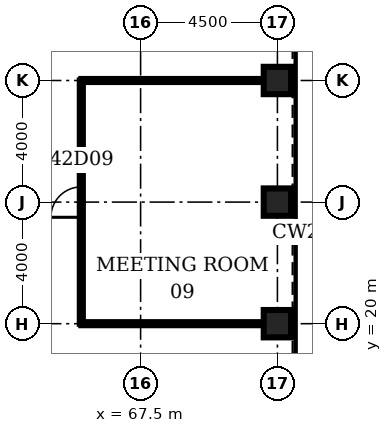
"""IFC4 building model, lengths in metres.
Left out: names, types, materials, properties, quantities, classifications, styles, units other than length and angle.
Written with IfcOpenShell. Run it as: python <this file> out.ifc"""

import sys

from ifc_helpers import new_model, si_unit, direction, frame, frame_2d, origin, origin_2d, place, context, subcontext, project, spatial, rectangle, hollow_rectangle, extrude, element, fill, save


model = new_model("IFC4")
c1 = context("Model", 3, precision=1e-05, world=origin(), true_north=direction((0.0, 1.0)))
c2 = subcontext(c1, "Body", "Model", "MODEL_VIEW")
j1 = project(units=[si_unit("LENGTHUNIT", "METRE"), si_unit("PLANEANGLEUNIT", "RADIAN")], contexts=[c1])
p1 = place(None, origin())
s1 = spatial("IfcSite", under=j1, at=p1, CompositionType="ELEMENT")
p2 = place(p1, origin())
s2 = spatial("IfcBuilding", under=s1, at=p2, CompositionType="ELEMENT")
p3 = place(p2, frame((0.0, 0.0, 190.0)))
s3 = spatial("IfcBuildingStorey", under=s2, at=p3, CompositionType="ELEMENT", Elevation=190.0)
for number, where, z_axis, x_axis in (
    (1, (72.0, 20.0, 0.0), (0.0, 0.0, 1.0), (1.0, 0.0, 0.0)),
    (2, (72.0, 24.0, 0.0), (0.0, 0.0, 1.0), (1.0, 0.0, 0.0)),
    (3, (72.0, 28.0, 0.0), (0.0, 0.0, 1.0), (1.0, 0.0, 0.0)),
):
    element("IfcColumn", number, at=place(p3, frame(where, z_axis=z_axis, x_axis=x_axis)), inside=s3, PredefinedType="COLUMN", context=c2, shape_type="SweptSolid", body=[
        extrude(hollow_rectangle(XDim=0.9, YDim=0.9, WallThickness=0.09, at=origin_2d()), origin(), (0.0, 0.0, 1.0), 4.2),
    ])
for number, where, z_axis, x_axis in (
    (4, (65.55, 20.0, 0.0), (0.0, 0.0, 1.0), (1.0, 0.0, 0.0)),
    (5, (65.55, 28.0, 0.0), (0.0, 0.0, 1.0), (1.0, 0.0, 0.0)),
):
    element("IfcWall", number, at=place(p3, frame(where, z_axis=z_axis, x_axis=x_axis)), inside=s3, PredefinedType="PARTITIONING", context=c2, shape_type="SweptSolid", body=[
        extrude(rectangle(XDim=6.0, YDim=0.1, at=frame_2d((3.0, 0.0))), origin(), (0.0, 0.0, 1.0), 3.0),
    ])
p4 = place(p3, frame((65.55, 20.0, 0.0), z_axis=(0.0, 0.0, 1.0), x_axis=(0.0, 1.0, 0.0)))
e6 = element("IfcWall", 6, at=p4, inside=s3, PredefinedType="PARTITIONING", context=c2, shape_type="SweptSolid", body=[
    extrude(rectangle(XDim=8.0, YDim=0.1, at=frame_2d((4.0, 0.0))), origin(), (0.0, 0.0, 1.0), 3.0),
])
p5 = place(p4, frame((3.5, 0.0, 0.0)))
e7 = element("IfcOpeningElement", 7, at=p5, cuts=e6, PredefinedType="OPENING", context=c2, shape_type="SweptSolid", body=[
    extrude(rectangle(XDim=1.0, YDim=2.1, at=frame_2d((0.5, 1.05))), frame((0.0, 0.06, 0.0), z_axis=(0.0, -1.0, 0.0), x_axis=(1.0, 0.0, 0.0)), (0.0, 0.0, 1.0), 0.12),
])
p6 = place(p5, origin())
e8 = element("IfcDoor", 8, at=p6, inside=s3, OperationType="SINGLE_SWING_LEFT", PredefinedType="DOOR", context=c2, shape_type="SweptSolid", body=[
    extrude(rectangle(XDim=1.0, YDim=2.1, at=frame_2d((0.5, 1.05))), frame((0.0, 0.025, 0.0), z_axis=(0.0, -1.0, 0.0), x_axis=(1.0, 0.0, 0.0)), (0.0, 0.0, 1.0), 0.05),
])
fill(e7, e8)
save(model, sys.argv[1])
